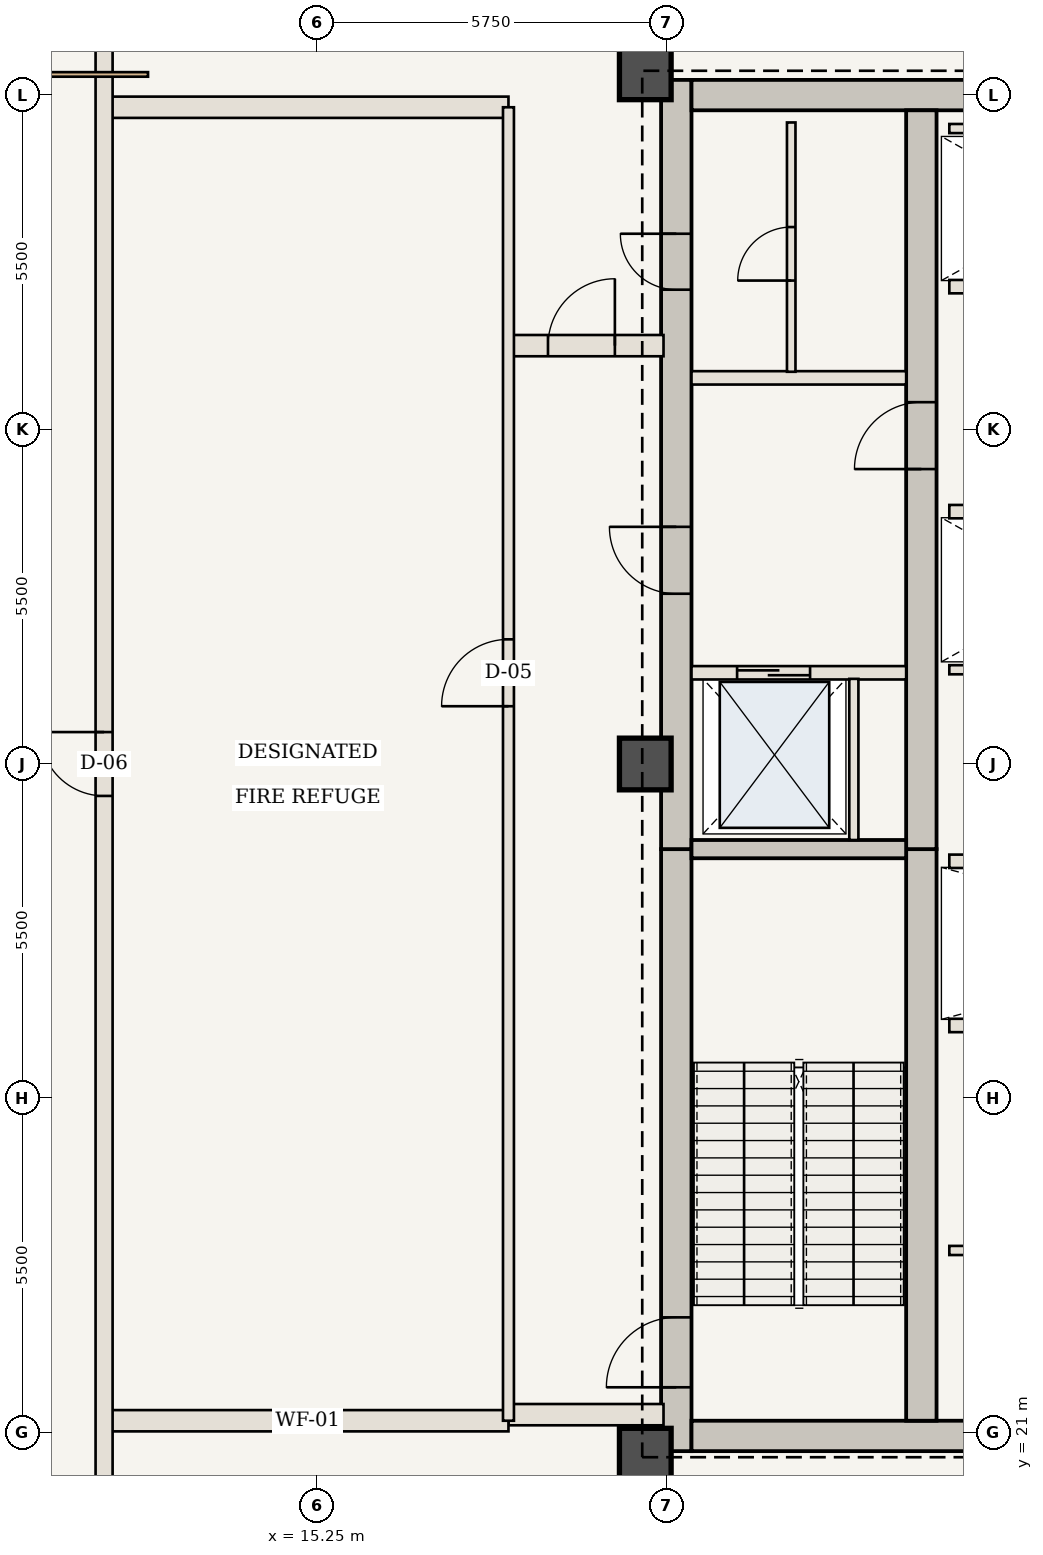
"""IFC4 building model, lengths in metres.
Left out: names, types, materials, properties, quantities, classifications, styles, units other than length and angle.
Written with IfcOpenShell. Run it as: python <this file> out.ifc"""

import sys

from ifc_helpers import new_model, si_unit, direction, frame, frame_2d, origin, origin_2d, place, context, subcontext, project, spatial, rectangle, extrude, element, fill, save


model = new_model("IFC4")
c1 = context("Model", 3, precision=1e-05, world=origin(), true_north=direction((0.0, 1.0)))
c2 = subcontext(c1, "Body", "Model", "MODEL_VIEW")
j1 = project(units=[si_unit("LENGTHUNIT", "METRE"), si_unit("PLANEANGLEUNIT", "RADIAN")], contexts=[c1])
p1 = place(None, origin())
s1 = spatial("IfcSite", under=j1, at=p1, CompositionType="ELEMENT")
p2 = place(p1, origin())
s2 = spatial("IfcBuilding", under=s1, at=p2, CompositionType="ELEMENT")
p3 = place(p2, frame((0.0, 0.0, 252.35)))
s3 = spatial("IfcBuildingStorey", under=s2, at=p3, CompositionType="ELEMENT", Elevation=252.35)
p4 = place(p3, frame((21.16, 20.7, 0.0), z_axis=(0.0, 0.0, 1.0), x_axis=(0.0, 1.0, 0.0)))
e1 = element("IfcWall", 1, at=p4, inside=s3, PredefinedType="SHEAR", context=c2, shape_type="SweptSolid", body=[
    extrude(rectangle(XDim=9.9, YDim=0.5, at=frame_2d((4.95, 0.0))), origin(), (0.0, 0.0, 1.0), 5.25),
])
p5 = place(p4, frame((1.05, 0.0, 0.0)))
e2 = element("IfcOpeningElement", 2, at=p5, cuts=e1, PredefinedType="OPENING", context=c2, shape_type="SweptSolid", body=[
    extrude(rectangle(XDim=1.15, YDim=2.15, at=frame_2d((0.575, 1.075))), frame((0.0, 0.26, 0.0), z_axis=(0.0, -1.0, 0.0), x_axis=(1.0, 0.0, 0.0)), (0.0, 0.0, 1.0), 0.52),
])
p6 = place(p3, frame((21.16, 30.6, 0.0), z_axis=(0.0, 0.0, 1.0), x_axis=(0.0, 1.0, 0.0)))
e3 = element("IfcWall", 3, at=p6, inside=s3, PredefinedType="SHEAR", context=c2, shape_type="SweptSolid", body=[
    extrude(rectangle(XDim=12.65, YDim=0.5, at=frame_2d((6.325, 0.0))), origin(), (0.0, 0.0, 1.0), 5.25),
])
p7 = place(p6, frame((4.2, 0.0, 0.0)))
e4 = element("IfcOpeningElement", 4, at=p7, cuts=e3, PredefinedType="OPENING", context=c2, shape_type="SweptSolid", body=[
    extrude(rectangle(XDim=1.1, YDim=2.15, at=frame_2d((0.55, 1.075))), frame((0.0, 0.26, 0.0), z_axis=(0.0, -1.0, 0.0), x_axis=(1.0, 0.0, 0.0)), (0.0, 0.0, 1.0), 0.52),
])
p8 = place(p6, frame((9.2, 0.0, 0.0)))
e5 = element("IfcOpeningElement", 5, at=p8, cuts=e3, PredefinedType="OPENING", context=c2, shape_type="SweptSolid", body=[
    extrude(rectangle(XDim=0.92, YDim=2.1, at=frame_2d((0.46, 1.05))), frame((0.0, 0.26, 0.0), z_axis=(0.0, -1.0, 0.0), x_axis=(1.0, 0.0, 0.0)), (0.0, 0.0, 1.0), 0.52),
])
p9 = place(p3, frame((21.41, 20.95, 0.0), z_axis=(0.0, 0.0, 1.0), x_axis=(1.0, 0.0, 0.0)))
e6 = element("IfcWall", 6, at=p9, inside=s3, PredefinedType="SHEAR", context=c2, shape_type="SweptSolid", body=[
    extrude(rectangle(XDim=13.74, YDim=0.5, at=frame_2d((6.87, 0.0))), origin(), (0.0, 0.0, 1.0), 5.25),
])
p10 = place(p3, frame((21.41, 43.0, 0.0), z_axis=(0.0, 0.0, 1.0), x_axis=(1.0, 0.0, 0.0)))
e7 = element("IfcWall", 7, at=p10, inside=s3, PredefinedType="SHEAR", context=c2, shape_type="SweptSolid", body=[
    extrude(rectangle(XDim=12.79, YDim=0.5, at=frame_2d((6.395, 0.0))), origin(), (0.0, 0.0, 1.0), 5.25),
])
p11 = place(p3, frame((25.19, 21.2, 0.0), z_axis=(0.0, 0.0, 1.0), x_axis=(0.0, 1.0, 0.0)))
e8 = element("IfcWall", 8, at=p11, inside=s3, PredefinedType="SHEAR", context=c2, shape_type="SweptSolid", body=[
    extrude(rectangle(XDim=9.4, YDim=0.5, at=frame_2d((4.7, 0.0))), origin(), (0.0, 0.0, 1.0), 5.25),
])
p12 = place(p3, frame((25.19, 30.6, 0.0), z_axis=(0.0, 0.0, 1.0), x_axis=(0.0, 1.0, 0.0)))
e9 = element("IfcWall", 9, at=p12, inside=s3, PredefinedType="SHEAR", context=c2, shape_type="SweptSolid", body=[
    extrude(rectangle(XDim=12.15, YDim=0.5, at=frame_2d((6.075, 0.0))), origin(), (0.0, 0.0, 1.0), 5.25),
])
p13 = place(p12, frame((6.25, 0.0, 0.0)))
e10 = element("IfcOpeningElement", 10, at=p13, cuts=e9, PredefinedType="OPENING", context=c2, shape_type="SweptSolid", body=[
    extrude(rectangle(XDim=1.1, YDim=2.15, at=frame_2d((0.55, 1.075))), frame((0.0, 0.26, 0.0), z_axis=(0.0, -1.0, 0.0), x_axis=(1.0, 0.0, 0.0)), (0.0, 0.0, 1.0), 0.52),
])
for number, where, z_axis, x_axis in (
    (11, (20.65, 20.65, 0.0), (0.0, 0.0, 1.0), (1.0, 0.0, 0.0)),
    (12, (20.65, 43.35, 0.0), (0.0, 0.0, 1.0), (1.0, 0.0, 0.0)),
    (13, (20.65, 32.0, 0.0), (0.0, 0.0, 1.0), (1.0, 0.0, 0.0)),
):
    element("IfcColumn", number, at=place(p3, frame(where, z_axis=z_axis, x_axis=x_axis)), inside=s3, PredefinedType="COLUMN", context=c2, shape_type="SweptSolid", body=[
        extrude(rectangle(XDim=0.85, YDim=0.85, at=origin_2d()), origin(), (0.0, 0.0, 1.0), 4.83),
    ])
p14 = place(p3, frame((21.41, 30.6, 0.0), z_axis=(0.0, 0.0, 1.0), x_axis=(1.0, 0.0, 0.0)))
e14 = element("IfcWall", 14, at=p14, inside=s3, PredefinedType="SHEAR", context=c2, shape_type="SweptSolid", body=[
    extrude(rectangle(XDim=3.53, YDim=0.3, at=frame_2d((1.765, 0.0))), origin(), (0.0, 0.0, 1.0), 4.83),
])
p15 = place(p3, frame((21.41, 33.5, 0.0), z_axis=(0.0, 0.0, 1.0), x_axis=(1.0, 0.0, 0.0)))
e15 = element("IfcWall", 15, at=p15, inside=s3, PredefinedType="STANDARD", context=c2, shape_type="SweptSolid", body=[
    extrude(rectangle(XDim=3.53, YDim=0.22, at=frame_2d((1.765, 0.0))), origin(), (0.0, 0.0, 1.0), 4.83),
])
p16 = place(p15, frame((0.75, 0.0, 0.0)))
e16 = element("IfcOpeningElement", 16, at=p16, cuts=e15, PredefinedType="OPENING", context=c2, shape_type="SweptSolid", body=[
    extrude(rectangle(XDim=1.2, YDim=2.2, at=frame_2d((0.6, 1.1))), frame((0.0, 0.12, 0.0), z_axis=(0.0, -1.0, 0.0), x_axis=(1.0, 0.0, 0.0)), (0.0, 0.0, 1.0), 0.24),
])
p17 = place(p3, frame((24.08, 30.75, 0.0), z_axis=(0.0, 0.0, 1.0), x_axis=(0.0, 1.0, 0.0)))
e17 = element("IfcWall", 17, at=p17, inside=s3, PredefinedType="STANDARD", context=c2, shape_type="SweptSolid", body=[
    extrude(rectangle(XDim=2.65, YDim=0.15, at=frame_2d((1.325, 0.0))), origin(), (0.0, 0.0, 1.0), 4.83),
])
p18 = place(p3, frame((21.41, 38.35, 0.0), z_axis=(0.0, 0.0, 1.0), x_axis=(1.0, 0.0, 0.0)))
e18 = element("IfcWall", 18, at=p18, inside=s3, PredefinedType="STANDARD", context=c2, shape_type="SweptSolid", body=[
    extrude(rectangle(XDim=3.53, YDim=0.22, at=frame_2d((1.765, 0.0))), origin(), (0.0, 0.0, 1.0), 4.83),
])
p19 = place(p3, frame((23.05, 38.45, 0.0), z_axis=(0.0, 0.0, 1.0), x_axis=(0.0, 1.0, 0.0)))
e19 = element("IfcWall", 19, at=p19, inside=s3, PredefinedType="STANDARD", context=c2, shape_type="SweptSolid", body=[
    extrude(rectangle(XDim=4.1, YDim=0.14, at=frame_2d((2.05, 0.0))), origin(), (0.0, 0.0, 1.0), 4.83),
])
p20 = place(p19, frame((1.5, 0.0, 0.0)))
e20 = element("IfcOpeningElement", 20, at=p20, cuts=e19, PredefinedType="OPENING", context=c2, shape_type="SweptSolid", body=[
    extrude(rectangle(XDim=0.88, YDim=2.1, at=frame_2d((0.44, 1.05))), frame((0.0, 0.08, 0.0), z_axis=(0.0, -1.0, 0.0), x_axis=(1.0, 0.0, 0.0)), (0.0, 0.0, 1.0), 0.16),
])
p21 = place(p3, frame((25.65, 24.0, 0.0), z_axis=(0.0, 0.0, 1.0), x_axis=(1.0, 0.0, 0.0)))
e21 = element("IfcWall", 21, at=p21, inside=s3, PredefinedType="STANDARD", context=c2, shape_type="SweptSolid", body=[
    extrude(rectangle(XDim=9.35, YDim=0.15, at=frame_2d((4.675, 0.0))), origin(), (0.0, 0.0, 1.0), 4.83),
])
p22 = place(p21, frame((3.8, 0.0, 0.0)))
e22 = element("IfcOpeningElement", 22, at=p22, cuts=e21, PredefinedType="OPENING", context=c2, shape_type="SweptSolid", body=[
    extrude(rectangle(XDim=0.95, YDim=2.15, at=frame_2d((0.475, 1.075))), frame((0.0, 0.085, 0.0), z_axis=(0.0, -1.0, 0.0), x_axis=(1.0, 0.0, 0.0)), (0.0, 0.0, 1.0), 0.17),
])
for number, where, z_axis, x_axis in (
    (23, (25.65, 27.7, 0.0), (0.0, 0.0, 1.0), (1.0, 0.0, 0.0)),
    (24, (25.65, 30.4, 0.0), (0.0, 0.0, 1.0), (1.0, 0.0, 0.0)),
):
    element("IfcWall", number, at=place(p3, frame(where, z_axis=z_axis, x_axis=x_axis)), inside=s3, PredefinedType="STANDARD", context=c2, shape_type="SweptSolid", body=[
        extrude(rectangle(XDim=9.25, YDim=0.22, at=frame_2d((4.625, 0.0))), origin(), (0.0, 0.0, 1.0), 4.83),
    ])
p23 = place(p3, frame((25.65, 36.15, 0.0), z_axis=(0.0, 0.0, 1.0), x_axis=(1.0, 0.0, 0.0)))
e25 = element("IfcWall", 25, at=p23, inside=s3, PredefinedType="STANDARD", context=c2, shape_type="SweptSolid", body=[
    extrude(rectangle(XDim=4.3, YDim=0.22, at=frame_2d((2.15, 0.0))), origin(), (0.0, 0.0, 1.0), 4.83),
])
p24 = place(p3, frame((25.65, 33.55, 0.0), z_axis=(0.0, 0.0, 1.0), x_axis=(1.0, 0.0, 0.0)))
e26 = element("IfcWall", 26, at=p24, inside=s3, PredefinedType="STANDARD", context=c2, shape_type="SweptSolid", body=[
    extrude(rectangle(XDim=4.2, YDim=0.15, at=frame_2d((2.1, 0.0))), origin(), (0.0, 0.0, 1.0), 4.83),
])
p25 = place(p3, frame((25.65, 39.85, 0.0), z_axis=(0.0, 0.0, 1.0), x_axis=(1.0, 0.0, 0.0)))
e27 = element("IfcWall", 27, at=p25, inside=s3, PredefinedType="STANDARD", context=c2, shape_type="SweptSolid", body=[
    extrude(rectangle(XDim=4.3, YDim=0.22, at=frame_2d((2.15, 0.0))), origin(), (0.0, 0.0, 1.0), 4.83),
])
p26 = place(p3, frame((25.65, 42.45, 0.0), z_axis=(0.0, 0.0, 1.0), x_axis=(1.0, 0.0, 0.0)))
e28 = element("IfcWall", 28, at=p26, inside=s3, PredefinedType="STANDARD", context=c2, shape_type="SweptSolid", body=[
    extrude(rectangle(XDim=4.2, YDim=0.15, at=frame_2d((2.1, 0.0))), origin(), (0.0, 0.0, 1.0), 4.83),
])
p27 = place(p3, frame((18.4, 21.3, 0.0), z_axis=(0.0, 0.0, 1.0), x_axis=(1.0, 0.0, 0.0)))
e29 = element("IfcWall", 29, at=p27, inside=s3, PredefinedType="STANDARD", context=c2, shape_type="SweptSolid", body=[
    extrude(rectangle(XDim=2.55, YDim=0.35, at=frame_2d((1.275, 0.0))), origin(), (0.0, 0.0, 1.0), 2.858),
])
p28 = place(p3, frame((18.4, 38.88, 0.0), z_axis=(0.0, 0.0, 1.0), x_axis=(1.0, 0.0, 0.0)))
e30 = element("IfcWall", 30, at=p28, inside=s3, PredefinedType="STANDARD", context=c2, shape_type="SweptSolid", body=[
    extrude(rectangle(XDim=2.55, YDim=0.35, at=frame_2d((1.275, 0.0))), origin(), (0.0, 0.0, 1.0), 4.83),
])
p29 = place(p28, frame((0.65, 0.0, 0.0)))
e31 = element("IfcOpeningElement", 31, at=p29, cuts=e30, PredefinedType="OPENING", context=c2, shape_type="SweptSolid", body=[
    extrude(rectangle(XDim=1.1, YDim=2.15, at=frame_2d((0.55, 1.075))), frame((0.0, 0.185, 0.0), z_axis=(0.0, -1.0, 0.0), x_axis=(1.0, 0.0, 0.0)), (0.0, 0.0, 1.0), 0.37),
])
for number, where, z_axis, x_axis in (
    (32, (11.8, 21.2, 0.0), (0.0, 0.0, 1.0), (1.0, 0.0, 0.0)),
    (33, (11.8, 42.8, 0.0), (0.0, 0.0, 1.0), (1.0, 0.0, 0.0)),
):
    element("IfcWall", number, at=place(p3, frame(where, z_axis=z_axis, x_axis=x_axis)), inside=s3, PredefinedType="STANDARD", context=c2, shape_type="SweptSolid", body=[
        extrude(rectangle(XDim=6.6, YDim=0.35, at=frame_2d((3.3, 0.0))), origin(), (0.0, 0.0, 1.0), 2.858),
    ])
p30 = place(p3, frame((18.4, 21.2, 0.0), z_axis=(0.0, 0.0, 1.0), x_axis=(0.0, 1.0, 0.0)))
e34 = element("IfcWall", 34, at=p30, inside=s3, PredefinedType="STANDARD", context=c2, shape_type="SweptSolid", body=[
    extrude(rectangle(XDim=21.6, YDim=0.18, at=frame_2d((10.8, 0.0))), origin(), (0.0, 0.0, 1.0), 4.83),
])
p31 = place(p30, frame((11.75, 0.0, 0.0)))
e35 = element("IfcOpeningElement", 35, at=p31, cuts=e34, PredefinedType="OPENING", context=c2, shape_type="SweptSolid", body=[
    extrude(rectangle(XDim=1.1, YDim=2.15, at=frame_2d((0.55, 1.075))), frame((0.0, 0.1, 0.0), z_axis=(0.0, -1.0, 0.0), x_axis=(1.0, 0.0, 0.0)), (0.0, 0.0, 1.0), 0.2),
])
p32 = place(p3, frame((11.75, 11.75, 0.0), z_axis=(0.0, 0.0, 1.0), x_axis=(0.0, 1.0, 0.0)))
e36 = element("IfcWall", 36, at=p32, inside=s3, PredefinedType="USERDEFINED", context=c2, shape_type="SweptSolid", body=[
    extrude(rectangle(XDim=40.5, YDim=0.28, at=frame_2d((20.25, 0.0))), origin(), (0.0, 0.0, 1.0), 2.83),
])
p33 = place(p32, frame((19.725, 0.0, 0.0)))
e37 = element("IfcOpeningElement", 37, at=p33, cuts=e36, PredefinedType="OPENING", context=c2, shape_type="SweptSolid", body=[
    extrude(rectangle(XDim=1.05, YDim=2.2, at=frame_2d((0.525, 1.1))), frame((0.0, 0.15, 0.0), z_axis=(0.0, -1.0, 0.0), x_axis=(1.0, 0.0, 0.0)), (0.0, 0.0, 1.0), 0.3),
])
p34 = place(p5, origin())
e38 = element("IfcDoor", 38, at=p34, inside=s3, OperationType="SINGLE_SWING_LEFT", PredefinedType="DOOR", context=c2, shape_type="SweptSolid", body=[
    extrude(rectangle(XDim=1.15, YDim=2.15, at=frame_2d((0.575, 1.075))), frame((0.0, 0.025, 0.0), z_axis=(0.0, -1.0, 0.0), x_axis=(1.0, 0.0, 0.0)), (0.0, 0.0, 1.0), 0.05),
])
fill(e2, e38)
p35 = place(p7, origin())
e39 = element("IfcDoor", 39, at=p35, inside=s3, OperationType="SINGLE_SWING_RIGHT", PredefinedType="DOOR", context=c2, shape_type="SweptSolid", body=[
    extrude(rectangle(XDim=1.1, YDim=2.15, at=frame_2d((0.55, 1.075))), frame((0.0, 0.025, 0.0), z_axis=(0.0, -1.0, 0.0), x_axis=(1.0, 0.0, 0.0)), (0.0, 0.0, 1.0), 0.05),
])
fill(e4, e39)
p36 = place(p13, origin())
e40 = element("IfcDoor", 40, at=p36, inside=s3, OperationType="SINGLE_SWING_LEFT", PredefinedType="DOOR", context=c2, shape_type="SweptSolid", body=[
    extrude(rectangle(XDim=1.1, YDim=2.15, at=frame_2d((0.55, 1.075))), frame((0.0, 0.025, 0.0), z_axis=(0.0, -1.0, 0.0), x_axis=(1.0, 0.0, 0.0)), (0.0, 0.0, 1.0), 0.05),
])
fill(e10, e40)
p37 = place(p8, origin())
e41 = element("IfcDoor", 41, at=p37, inside=s3, OperationType="SINGLE_SWING_RIGHT", PredefinedType="DOOR", context=c2, shape_type="SweptSolid", body=[
    extrude(rectangle(XDim=0.92, YDim=2.1, at=frame_2d((0.46, 1.05))), frame((0.0, 0.025, 0.0), z_axis=(0.0, -1.0, 0.0), x_axis=(1.0, 0.0, 0.0)), (0.0, 0.0, 1.0), 0.05),
])
fill(e5, e41)
p38 = place(p16, origin())
e42 = element("IfcDoor", 42, at=p38, inside=s3, OperationType="DOUBLE_DOOR_SLIDING", PredefinedType="DOOR", context=c2, shape_type="SweptSolid", body=[
    extrude(rectangle(XDim=1.2, YDim=2.2, at=frame_2d((0.6, 1.1))), frame((0.0, 0.025, 0.0), z_axis=(0.0, -1.0, 0.0), x_axis=(1.0, 0.0, 0.0)), (0.0, 0.0, 1.0), 0.05),
])
fill(e16, e42)
p39 = place(p20, origin())
e43 = element("IfcDoor", 43, at=p39, inside=s3, OperationType="SINGLE_SWING_LEFT", PredefinedType="DOOR", context=c2, shape_type="SweptSolid", body=[
    extrude(rectangle(XDim=0.88, YDim=2.1, at=frame_2d((0.44, 1.05))), frame((0.0, 0.025, 0.0), z_axis=(0.0, -1.0, 0.0), x_axis=(1.0, 0.0, 0.0)), (0.0, 0.0, 1.0), 0.05),
])
fill(e20, e43)
p40 = place(p29, origin())
e44 = element("IfcDoor", 44, at=p40, inside=s3, OperationType="SINGLE_SWING_RIGHT", PredefinedType="DOOR", context=c2, shape_type="SweptSolid", body=[
    extrude(rectangle(XDim=1.1, YDim=2.15, at=frame_2d((0.55, 1.075))), frame((0.0, 0.025, 0.0), z_axis=(0.0, -1.0, 0.0), x_axis=(1.0, 0.0, 0.0)), (0.0, 0.0, 1.0), 0.05),
])
fill(e31, e44)
p41 = place(p31, origin())
e45 = element("IfcDoor", 45, at=p41, inside=s3, OperationType="SINGLE_SWING_LEFT", PredefinedType="DOOR", context=c2, shape_type="SweptSolid", body=[
    extrude(rectangle(XDim=1.1, YDim=2.15, at=frame_2d((0.55, 1.075))), frame((0.0, 0.025, 0.0), z_axis=(0.0, -1.0, 0.0), x_axis=(1.0, 0.0, 0.0)), (0.0, 0.0, 1.0), 0.05),
])
fill(e35, e45)
p42 = place(p33, origin())
e46 = element("IfcDoor", 46, at=p42, inside=s3, OperationType="SINGLE_SWING_RIGHT", PredefinedType="DOOR", context=c2, shape_type="SweptSolid", body=[
    extrude(rectangle(XDim=1.05, YDim=2.2, at=frame_2d((0.525, 1.1))), frame((0.0, 0.025, 0.0), z_axis=(0.0, -1.0, 0.0), x_axis=(1.0, 0.0, 0.0)), (0.0, 0.0, 1.0), 0.05),
])
fill(e37, e46)
save(model, sys.argv[1])
